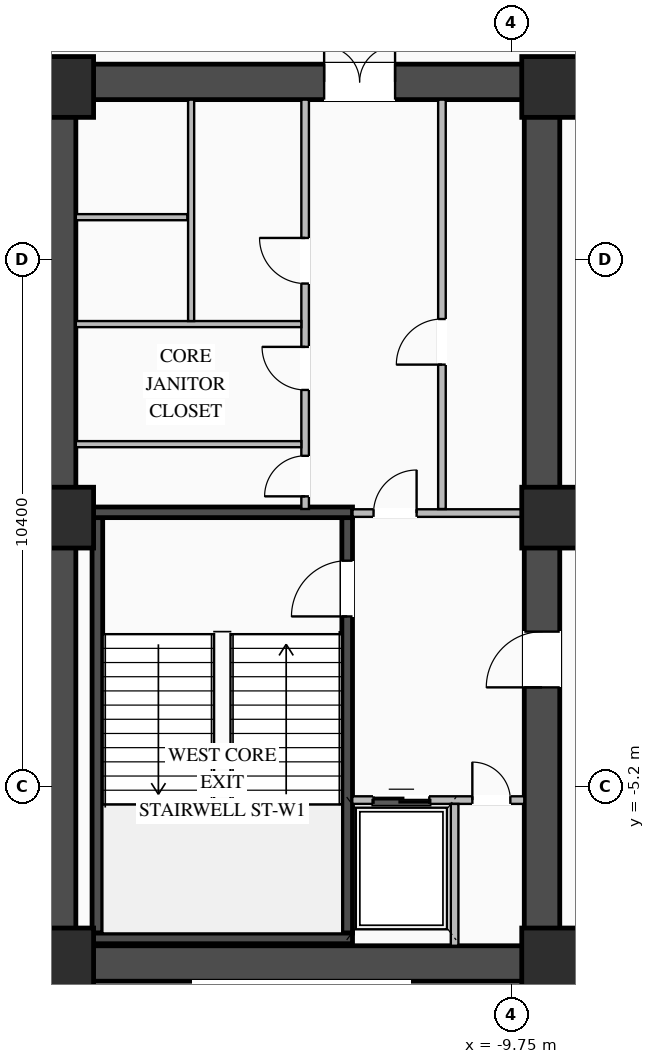
"""IFC4 building model, lengths in metres.
Left out: names, types, materials, properties, quantities, classifications, styles, units other than length and angle.
Written with IfcOpenShell. Run it as: python <this file> out.ifc"""

import sys

from ifc_helpers import new_model, si_unit, direction, frame, frame_2d, origin, origin_2d, place, context, subcontext, project, spatial, rectangle, extrude, element, fill, save


model = new_model("IFC4")
c1 = context("Model", 3, precision=1e-05, world=origin(), true_north=direction((0.0, 1.0)))
c2 = subcontext(c1, "Body", "Model", "MODEL_VIEW")
j1 = project(units=[si_unit("LENGTHUNIT", "METRE"), si_unit("PLANEANGLEUNIT", "RADIAN")], contexts=[c1])
p1 = place(None, origin())
s1 = spatial("IfcSite", under=j1, at=p1, CompositionType="ELEMENT")
p2 = place(p1, origin())
s2 = spatial("IfcBuilding", under=s1, at=p2, CompositionType="ELEMENT")
p3 = place(p2, frame((0.0, 0.0, -9.6)))
s3 = spatial("IfcBuildingStorey", under=s2, at=p3, CompositionType="ELEMENT", Elevation=-9.6)
p4 = place(p3, frame((-19.05, -8.7, 0.0), z_axis=(0.0, 0.0, 1.0), x_axis=(1.0, 0.0, 0.0)))
e1 = element("IfcWall", 1, at=p4, inside=s3, PredefinedType="SHEAR", context=c2, shape_type="SweptSolid", body=[
    extrude(rectangle(XDim=10.25, YDim=0.7, at=frame_2d((5.125, 0.0))), origin(), (0.0, 0.0, 1.0), 4.5),
])
p5 = place(p3, frame((-19.05, 8.7, 0.0), z_axis=(0.0, 0.0, 1.0), x_axis=(1.0, 0.0, 0.0)))
e2 = element("IfcWall", 2, at=p5, inside=s3, PredefinedType="SHEAR", context=c2, shape_type="SweptSolid", body=[
    extrude(rectangle(XDim=10.25, YDim=0.7, at=frame_2d((5.125, 0.0))), origin(), (0.0, 0.0, 1.0), 4.5),
])
p6 = place(p5, frame((5.6, 0.0, 0.0)))
e3 = element("IfcOpeningElement", 3, at=p6, cuts=e2, PredefinedType="OPENING", context=c2, shape_type="SweptSolid", body=[
    extrude(rectangle(XDim=1.4, YDim=2.05, at=frame_2d((0.7, 1.025))), frame((0.0, 0.36, 0.0), z_axis=(0.0, -1.0, 0.0), x_axis=(1.0, 0.0, 0.0)), (0.0, 0.0, 1.0), 0.72),
])
p7 = place(p3, frame((-18.7, -8.35, 0.0), z_axis=(0.0, 0.0, 1.0), x_axis=(0.0, 1.0, 0.0)))
e4 = element("IfcWall", 4, at=p7, inside=s3, PredefinedType="SHEAR", context=c2, shape_type="SweptSolid", body=[
    extrude(rectangle(XDim=16.7, YDim=0.7, at=frame_2d((8.35, 0.0))), origin(), (0.0, 0.0, 1.0), 4.5),
])
p8 = place(p3, frame((-9.15, -8.35, 0.0), z_axis=(0.0, 0.0, 1.0), x_axis=(0.0, 1.0, 0.0)))
e5 = element("IfcWall", 5, at=p8, inside=s3, PredefinedType="SHEAR", context=c2, shape_type="SweptSolid", body=[
    extrude(rectangle(XDim=16.7, YDim=0.7, at=frame_2d((8.35, 0.0))), origin(), (0.0, 0.0, 1.0), 4.5),
])
p9 = place(p8, frame((5.1, 0.0, 0.0)))
e6 = element("IfcOpeningElement", 6, at=p9, cuts=e5, PredefinedType="OPENING", context=c2, shape_type="SweptSolid", body=[
    extrude(rectangle(XDim=1.1, YDim=2.08, at=frame_2d((0.55, 1.04))), frame((0.0, 0.36, 0.0), z_axis=(0.0, -1.0, 0.0), x_axis=(1.0, 0.0, 0.0)), (0.0, 0.0, 1.0), 0.72),
])
p10 = place(p3, frame((-12.995, -8.1, 0.0), z_axis=(0.0, 0.0, 1.0), x_axis=(0.0, 1.0, 0.0)))
e7 = element("IfcWall", 7, at=p10, inside=s3, PredefinedType="SHEAR", context=c2, shape_type="SweptSolid", body=[
    extrude(rectangle(XDim=8.2, YDim=0.21, at=frame_2d((4.1, 0.0))), origin(), (0.0, 0.0, 1.0), 4.5),
])
p11 = place(p10, frame((6.25, 0.0, 0.0)))
e8 = element("IfcOpeningElement", 8, at=p11, cuts=e7, PredefinedType="OPENING", context=c2, shape_type="SweptSolid", body=[
    extrude(rectangle(XDim=1.1, YDim=2.15, at=frame_2d((0.55, 1.075))), frame((0.0, 0.115, 0.0), z_axis=(0.0, -1.0, 0.0), x_axis=(1.0, 0.0, 0.0)), (0.0, 0.0, 1.0), 0.23),
])
p12 = place(p3, frame((-17.925, -8.1, 0.0), z_axis=(0.0, 0.0, 1.0), x_axis=(0.0, 1.0, 0.0)))
e9 = element("IfcWall", 9, at=p12, inside=s3, PredefinedType="SHEAR", context=c2, shape_type="SweptSolid", body=[
    extrude(rectangle(XDim=8.2, YDim=0.21, at=frame_2d((4.1, 0.0))), origin(), (0.0, 0.0, 1.0), 4.5),
])
for number, where, z_axis, x_axis in (
    (10, (-18.03, -8.205, 0.0), (0.0, 0.0, 1.0), (1.0, 0.0, 0.0)),
    (11, (-12.89, 0.205, 0.0), (0.0, 0.0, 1.0), (-1.0, 0.0, 0.0)),
):
    element("IfcWall", number, at=place(p3, frame(where, z_axis=z_axis, x_axis=x_axis)), inside=s3, PredefinedType="SHEAR", context=c2, shape_type="SweptSolid", body=[
        extrude(rectangle(XDim=5.14, YDim=0.21, at=frame_2d((2.57, 0.0))), origin(), (0.0, 0.0, 1.0), 4.5),
    ])
for number, where, z_axis, x_axis in (
    (12, (-8.95, -8.6, 0.0), (0.0, 0.0, 1.0), (1.0, 0.0, 0.0)),
    (13, (-8.95, 0.1, 0.0), (0.0, 0.0, 1.0), (1.0, 0.0, 0.0)),
    (14, (-8.95, 8.6, 0.0), (0.0, 0.0, 1.0), (1.0, 0.0, 0.0)),
    (15, (-18.6, -8.6, 0.0), (0.0, 0.0, 1.0), (1.0, 0.0, 0.0)),
    (16, (-18.6, 0.1, 0.0), (0.0, 0.0, 1.0), (1.0, 0.0, 0.0)),
    (17, (-18.6, 8.6, 0.0), (0.0, 0.0, 1.0), (1.0, 0.0, 0.0)),
):
    element("IfcColumn", number, at=place(p3, frame(where, z_axis=z_axis, x_axis=x_axis)), inside=s3, PredefinedType="COLUMN", context=c2, shape_type="SweptSolid", body=[
        extrude(rectangle(XDim=1.2, YDim=1.2, at=origin_2d()), origin(), (0.0, 0.0, 1.0), 4.8),
    ])
p13 = place(p3, frame((-12.895, -5.475, 0.0), z_axis=(0.0, 0.0, 1.0), x_axis=(1.0, 0.0, 0.0)))
e18 = element("IfcWall", 18, at=p13, inside=s3, PredefinedType="STANDARD", context=c2, shape_type="SweptSolid", body=[
    extrude(rectangle(XDim=3.395, YDim=0.15, at=frame_2d((1.698, 0.0))), origin(), (0.0, 0.0, 1.0), 4.48),
])
p14 = place(p13, frame((0.42, 0.0, 0.0)))
e19 = element("IfcOpeningElement", 19, at=p14, cuts=e18, PredefinedType="OPENING", context=c2, shape_type="SweptSolid", body=[
    extrude(rectangle(XDim=1.1, YDim=2.15, at=frame_2d((0.55, 1.075))), frame((0.0, 0.085, 0.0), z_axis=(0.0, -1.0, 0.0), x_axis=(1.0, 0.0, 0.0)), (0.0, 0.0, 1.0), 0.17),
])
p15 = place(p13, frame((2.37, 0.0, 0.0)))
e20 = element("IfcOpeningElement", 20, at=p15, cuts=e18, PredefinedType="OPENING", context=c2, shape_type="SweptSolid", body=[
    extrude(rectangle(XDim=0.75, YDim=2.05, at=frame_2d((0.375, 1.025))), frame((0.0, 0.085, 0.0), z_axis=(0.0, -1.0, 0.0), x_axis=(1.0, 0.0, 0.0)), (0.0, 0.0, 1.0), 0.17),
])
p16 = place(p3, frame((-10.875, -8.35, 0.0), z_axis=(0.0, 0.0, 1.0), x_axis=(0.0, 1.0, 0.0)))
e21 = element("IfcWall", 21, at=p16, inside=s3, PredefinedType="STANDARD", context=c2, shape_type="SweptSolid", body=[
    extrude(rectangle(XDim=2.8, YDim=0.15, at=frame_2d((1.4, 0.0))), origin(), (0.0, 0.0, 1.0), 4.48),
])
p17 = place(p3, frame((-12.89, 0.19, 0.0), z_axis=(0.0, 0.0, 1.0), x_axis=(1.0, 0.0, 0.0)))
e22 = element("IfcWall", 22, at=p17, inside=s3, PredefinedType="STANDARD", context=c2, shape_type="SweptSolid", body=[
    extrude(rectangle(XDim=3.39, YDim=0.15, at=frame_2d((1.695, 0.0))), origin(), (0.0, 0.0, 1.0), 3.675),
])
p18 = place(p17, frame((0.415, 0.0, 0.0)))
e23 = element("IfcOpeningElement", 23, at=p18, cuts=e22, PredefinedType="OPENING", context=c2, shape_type="SweptSolid", body=[
    extrude(rectangle(XDim=0.85, YDim=2.04, at=frame_2d((0.425, 1.02))), frame((0.0, 0.085, 0.0), z_axis=(0.0, -1.0, 0.0), x_axis=(1.0, 0.0, 0.0)), (0.0, 0.0, 1.0), 0.17),
])
p19 = place(p3, frame((-11.125, 0.27, 0.0), z_axis=(0.0, 0.0, 1.0), x_axis=(0.0, 1.0, 0.0)))
e24 = element("IfcWall", 24, at=p19, inside=s3, PredefinedType="STANDARD", context=c2, shape_type="SweptSolid", body=[
    extrude(rectangle(XDim=8.08, YDim=0.15, at=frame_2d((4.04, 0.0))), origin(), (0.0, 0.0, 1.0), 4.48),
])
p20 = place(p19, frame((2.85, 0.0, 0.0)))
e25 = element("IfcOpeningElement", 25, at=p20, cuts=e24, PredefinedType="OPENING", context=c2, shape_type="SweptSolid", body=[
    extrude(rectangle(XDim=0.9, YDim=2.05, at=frame_2d((0.45, 1.025))), frame((0.0, 0.085, 0.0), z_axis=(0.0, -1.0, 0.0), x_axis=(1.0, 0.0, 0.0)), (0.0, 0.0, 1.0), 0.17),
])
p21 = place(p3, frame((-13.825, 0.27, 0.0), z_axis=(0.0, 0.0, 1.0), x_axis=(0.0, 1.0, 0.0)))
e26 = element("IfcWall", 26, at=p21, inside=s3, PredefinedType="STANDARD", context=c2, shape_type="SweptSolid", body=[
    extrude(rectangle(XDim=8.08, YDim=0.15, at=frame_2d((4.04, 0.0))), origin(), (0.0, 0.0, 1.0), 4.48),
])
p22 = place(p21, frame((4.45, 0.0, 0.0)))
e27 = element("IfcOpeningElement", 27, at=p22, cuts=e26, PredefinedType="OPENING", context=c2, shape_type="SweptSolid", body=[
    extrude(rectangle(XDim=0.9, YDim=2.05, at=frame_2d((0.45, 1.025))), frame((0.0, 0.085, 0.0), z_axis=(0.0, -1.0, 0.0), x_axis=(1.0, 0.0, 0.0)), (0.0, 0.0, 1.0), 0.17),
])
p23 = place(p21, frame((0.25, 0.0, 0.0)))
e28 = element("IfcOpeningElement", 28, at=p23, cuts=e26, PredefinedType="OPENING", context=c2, shape_type="SweptSolid", body=[
    extrude(rectangle(XDim=0.8, YDim=2.05, at=frame_2d((0.4, 1.025))), frame((0.0, 0.085, 0.0), z_axis=(0.0, -1.0, 0.0), x_axis=(1.0, 0.0, 0.0)), (0.0, 0.0, 1.0), 0.17),
])
p24 = place(p21, frame((2.35, 0.0, 0.0)))
e29 = element("IfcOpeningElement", 29, at=p24, cuts=e26, PredefinedType="OPENING", context=c2, shape_type="SweptSolid", body=[
    extrude(rectangle(XDim=0.85, YDim=2.05, at=frame_2d((0.425, 1.025))), frame((0.0, 0.085, 0.0), z_axis=(0.0, -1.0, 0.0), x_axis=(1.0, 0.0, 0.0)), (0.0, 0.0, 1.0), 0.17),
])
p25 = place(p3, frame((-18.35, 3.92, 0.0), z_axis=(0.0, 0.0, 1.0), x_axis=(1.0, 0.0, 0.0)))
e30 = element("IfcWall", 30, at=p25, inside=s3, PredefinedType="STANDARD", context=c2, shape_type="SweptSolid", body=[
    extrude(rectangle(XDim=4.45, YDim=0.12, at=frame_2d((2.225, 0.0))), origin(), (0.0, 0.0, 1.0), 4.48),
])
p26 = place(p3, frame((-18.35, 6.03, 0.0), z_axis=(0.0, 0.0, 1.0), x_axis=(1.0, 0.0, 0.0)))
e31 = element("IfcWall", 31, at=p26, inside=s3, PredefinedType="STANDARD", context=c2, shape_type="SweptSolid", body=[
    extrude(rectangle(XDim=2.2, YDim=0.12, at=frame_2d((1.1, 0.0))), origin(), (0.0, 0.0, 1.0), 4.48),
])
p27 = place(p3, frame((-16.075, 3.98, 0.0), z_axis=(0.0, 0.0, 1.0), x_axis=(0.0, 1.0, 0.0)))
e32 = element("IfcWall", 32, at=p27, inside=s3, PredefinedType="STANDARD", context=c2, shape_type="SweptSolid", body=[
    extrude(rectangle(XDim=4.37, YDim=0.12, at=frame_2d((2.185, 0.0))), origin(), (0.0, 0.0, 1.0), 4.48),
])
p28 = place(p3, frame((-18.35, 1.55, 0.0), z_axis=(0.0, 0.0, 1.0), x_axis=(1.0, 0.0, 0.0)))
e33 = element("IfcWall", 33, at=p28, inside=s3, PredefinedType="STANDARD", context=c2, shape_type="SweptSolid", body=[
    extrude(rectangle(XDim=4.45, YDim=0.12, at=frame_2d((2.225, 0.0))), origin(), (0.0, 0.0, 1.0), 4.48),
])
p29 = place(p11, origin())
e34 = element("IfcDoor", 34, at=p29, inside=s3, OperationType="SINGLE_SWING_LEFT", PredefinedType="DOOR", context=c2, shape_type="SweptSolid", body=[
    extrude(rectangle(XDim=1.1, YDim=2.15, at=frame_2d((0.55, 1.075))), frame((0.0, 0.025, 0.0), z_axis=(0.0, -1.0, 0.0), x_axis=(1.0, 0.0, 0.0)), (0.0, 0.0, 1.0), 0.05),
])
fill(e8, e34)
p30 = place(p14, origin())
e35 = element("IfcDoor", 35, at=p30, inside=s3, OperationType="DOUBLE_DOOR_SLIDING", PredefinedType="DOOR", context=c2, shape_type="SweptSolid", body=[
    extrude(rectangle(XDim=1.1, YDim=2.15, at=frame_2d((0.55, 1.075))), frame((0.0, 0.025, 0.0), z_axis=(0.0, -1.0, 0.0), x_axis=(1.0, 0.0, 0.0)), (0.0, 0.0, 1.0), 0.05),
])
fill(e19, e35)
p31 = place(p15, origin())
e36 = element("IfcDoor", 36, at=p31, inside=s3, OperationType="SINGLE_SWING_LEFT", PredefinedType="DOOR", context=c2, shape_type="SweptSolid", body=[
    extrude(rectangle(XDim=0.75, YDim=2.05, at=frame_2d((0.375, 1.025))), frame((0.0, 0.025, 0.0), z_axis=(0.0, -1.0, 0.0), x_axis=(1.0, 0.0, 0.0)), (0.0, 0.0, 1.0), 0.05),
])
fill(e20, e36)
p32 = place(p18, origin())
e37 = element("IfcDoor", 37, at=p32, inside=s3, OperationType="SINGLE_SWING_RIGHT", PredefinedType="DOOR", context=c2, shape_type="SweptSolid", body=[
    extrude(rectangle(XDim=0.85, YDim=2.04, at=frame_2d((0.425, 1.02))), frame((0.0, 0.025, 0.0), z_axis=(0.0, -1.0, 0.0), x_axis=(1.0, 0.0, 0.0)), (0.0, 0.0, 1.0), 0.05),
])
fill(e23, e37)
p33 = place(p9, origin())
e38 = element("IfcDoor", 38, at=p33, inside=s3, OperationType="SINGLE_SWING_LEFT", PredefinedType="DOOR", context=c2, shape_type="SweptSolid", body=[
    extrude(rectangle(XDim=1.1, YDim=2.08, at=frame_2d((0.55, 1.04))), frame((0.0, 0.305, 0.0), z_axis=(0.0, -1.0, 0.0), x_axis=(1.0, 0.0, 0.0)), (0.0, 0.0, 1.0), 0.05),
])
fill(e6, e38)
p34 = place(p6, origin())
e39 = element("IfcDoor", 39, at=p34, inside=s3, OperationType="DOUBLE_DOOR_SINGLE_SWING", PredefinedType="DOOR", context=c2, shape_type="SweptSolid", body=[
    extrude(rectangle(XDim=1.4, YDim=2.05, at=frame_2d((0.7, 1.025))), frame((0.0, 0.295, 0.0), z_axis=(0.0, -1.0, 0.0), x_axis=(1.0, 0.0, 0.0)), (0.0, 0.0, 1.0), 0.05),
])
fill(e3, e39)
p35 = place(p20, origin())
e40 = element("IfcDoor", 40, at=p35, inside=s3, OperationType="SINGLE_SWING_LEFT", PredefinedType="DOOR", context=c2, shape_type="SweptSolid", body=[
    extrude(rectangle(XDim=0.9, YDim=2.05, at=frame_2d((0.45, 1.025))), frame((0.0, 0.025, 0.0), z_axis=(0.0, -1.0, 0.0), x_axis=(1.0, 0.0, 0.0)), (0.0, 0.0, 1.0), 0.05),
])
fill(e25, e40)
p36 = place(p22, origin())
e41 = element("IfcDoor", 41, at=p36, inside=s3, OperationType="SINGLE_SWING_RIGHT", PredefinedType="DOOR", context=c2, shape_type="SweptSolid", body=[
    extrude(rectangle(XDim=0.9, YDim=2.05, at=frame_2d((0.45, 1.025))), frame((0.0, 0.025, 0.0), z_axis=(0.0, -1.0, 0.0), x_axis=(1.0, 0.0, 0.0)), (0.0, 0.0, 1.0), 0.05),
])
fill(e27, e41)
p37 = place(p23, origin())
e42 = element("IfcDoor", 42, at=p37, inside=s3, OperationType="SINGLE_SWING_LEFT", PredefinedType="DOOR", context=c2, shape_type="SweptSolid", body=[
    extrude(rectangle(XDim=0.8, YDim=2.05, at=frame_2d((0.4, 1.025))), frame((0.0, 0.025, 0.0), z_axis=(0.0, -1.0, 0.0), x_axis=(1.0, 0.0, 0.0)), (0.0, 0.0, 1.0), 0.05),
])
fill(e28, e42)
p38 = place(p24, origin())
e43 = element("IfcDoor", 43, at=p38, inside=s3, OperationType="SINGLE_SWING_RIGHT", PredefinedType="DOOR", context=c2, shape_type="SweptSolid", body=[
    extrude(rectangle(XDim=0.85, YDim=2.05, at=frame_2d((0.425, 1.025))), frame((0.0, 0.025, 0.0), z_axis=(0.0, -1.0, 0.0), x_axis=(1.0, 0.0, 0.0)), (0.0, 0.0, 1.0), 0.05),
])
fill(e29, e43)
save(model, sys.argv[1])
